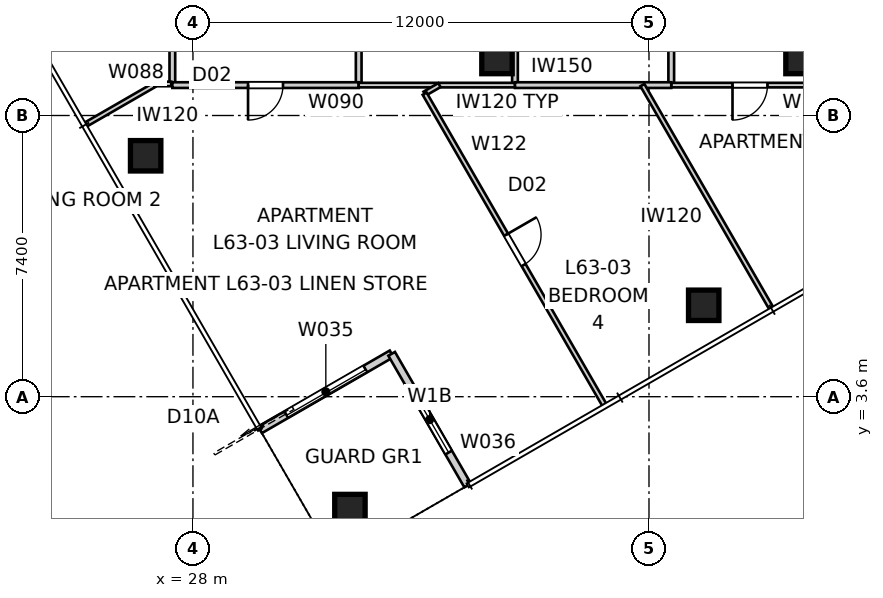
"""IFC4 building model, lengths in metres.
Left out: names, types, materials, properties, quantities, classifications, styles, units other than length and angle.
Written with IfcOpenShell. Run it as: python <this file> out.ifc"""

import sys

from ifc_helpers import new_model, si_unit, direction, frame, frame_2d, origin, origin_2d, place, context, subcontext, project, spatial, rectangle, extrude, element, fill, save


model = new_model("IFC4")
c1 = context("Model", 3, precision=1e-05, world=origin(), true_north=direction((0.0, 1.0)))
c2 = subcontext(c1, "Body", "Model", "MODEL_VIEW")
j1 = project(units=[si_unit("LENGTHUNIT", "METRE"), si_unit("PLANEANGLEUNIT", "RADIAN")], contexts=[c1])
p1 = place(None, origin())
s1 = spatial("IfcSite", under=j1, at=p1, CompositionType="ELEMENT")
p2 = place(p1, origin())
s2 = spatial("IfcBuilding", under=s1, at=p2, CompositionType="ELEMENT")
p3 = place(p2, frame((0.0, 0.0, 228.6)))
s3 = spatial("IfcBuildingStorey", under=s2, at=p3, CompositionType="ELEMENT", Elevation=228.6)
for number, where, z_axis, x_axis in (
    (1, (32.13, 0.63, 0.0), (0.0, 0.0, 1.0), (1.0, 0.0, 0.0)),
    (2, (41.44, 6.005, 0.0), (0.0, 0.0, 1.0), (1.0, 0.0, 0.0)),
    (3, (26.755, 9.94, 0.0), (0.0, 0.0, 1.0), (1.0, 0.0, 0.0)),
    (4, (36.0, 12.5, 0.0), (0.0, 0.0, 1.0), (1.0, 0.0, 0.0)),
    (5, (44.0, 12.5, 0.0), (0.0, 0.0, 1.0), (1.0, 0.0, 0.0)),
):
    element("IfcColumn", number, at=place(p3, frame(where, z_axis=z_axis, x_axis=x_axis)), inside=s3, PredefinedType="COLUMN", context=c2, shape_type="SweptSolid", body=[
        extrude(rectangle(XDim=0.8, YDim=0.8, at=origin_2d()), origin(), (0.0, 0.0, 1.0), 3.4),
    ])
p4 = place(p3, frame((29.764, 2.729, 0.0), z_axis=(0.0, 0.0, 1.0), x_axis=(0.866026010844, 0.49999894854, 0.0)))
e6 = element("IfcWall", 6, at=p4, inside=s3, PredefinedType="SOLIDWALL", context=c2, shape_type="SweptSolid", body=[
    extrude(rectangle(XDim=4.0, YDim=0.2, at=frame_2d((2.0, 0.0))), origin(), (0.0, 0.0, 1.0), 3.25),
])
p5 = place(p4, frame((0.8, 0.0, 0.0)))
e7 = element("IfcOpeningElement", 7, at=p5, cuts=e6, PredefinedType="OPENING", context=c2, shape_type="SweptSolid", body=[
    extrude(rectangle(XDim=2.4, YDim=2.1, at=frame_2d((1.2, 1.05))), frame((0.0, 0.11, 0.0), z_axis=(0.0, -1.0, 0.0), x_axis=(1.0, 0.0, 0.0)), (0.0, 0.0, 1.0), 0.22),
])
p6 = place(p3, frame((33.229, 4.729, 0.0), z_axis=(0.0, 0.0, 1.0), x_axis=(0.49999894854, -0.866026010844, 0.0)))
e8 = element("IfcWall", 8, at=p6, inside=s3, PredefinedType="SOLIDWALL", context=c2, shape_type="SweptSolid", body=[
    extrude(rectangle(XDim=4.0, YDim=0.2, at=frame_2d((2.0, 0.0))), origin(), (0.0, 0.0, 1.0), 3.25),
])
p7 = place(p6, frame((1.0, 0.0, 0.45)))
e9 = element("IfcOpeningElement", 9, at=p7, cuts=e8, PredefinedType="OPENING", context=c2, shape_type="SweptSolid", body=[
    extrude(rectangle(XDim=2.0, YDim=1.8, at=frame_2d((1.0, 0.9))), frame((0.0, 0.11, 0.0), z_axis=(0.0, -1.0, 0.0), x_axis=(1.0, 0.0, 0.0)), (0.0, 0.0, 1.0), 0.22),
])
p8 = place(p3, frame((27.458, 11.8, 0.0), z_axis=(0.0, 0.0, 1.0), x_axis=(0.0, 1.0, 0.0)))
e10 = element("IfcWall", 10, at=p8, inside=s3, PredefinedType="SOLIDWALL", context=c2, shape_type="SweptSolid", body=[
    extrude(rectangle(XDim=6.15, YDim=0.15, at=frame_2d((3.075, 0.0))), origin(), (0.0, 0.0, 1.0), 3.25),
])
p9 = place(p8, frame((4.396, 0.0, 0.0)))
e11 = element("IfcOpeningElement", 11, at=p9, cuts=e10, PredefinedType="OPENING", context=c2, shape_type="SweptSolid", body=[
    extrude(rectangle(XDim=0.96, YDim=2.1, at=frame_2d((0.48, 1.05))), frame((0.0, 0.085, 0.0), z_axis=(0.0, -1.0, 0.0), x_axis=(1.0, 0.0, 0.0)), (0.0, 0.0, 1.0), 0.17),
])
p10 = place(p8, frame((1.074, 0.0, 0.0)))
e12 = element("IfcOpeningElement", 12, at=p10, cuts=e10, PredefinedType="OPENING", context=c2, shape_type="SweptSolid", body=[
    extrude(rectangle(XDim=0.92, YDim=2.34, at=frame_2d((0.46, 1.17))), frame((0.0, 0.085, 0.0), z_axis=(0.0, -1.0, 0.0), x_axis=(1.0, 0.0, 0.0)), (0.0, 0.0, 1.0), 0.17),
])
p11 = place(p3, frame((32.361, 14.869, 0.0), z_axis=(0.0, 0.0, 1.0), x_axis=(0.0, -1.0, 0.0)))
e13 = element("IfcWall", 13, at=p11, inside=s3, PredefinedType="SOLIDWALL", context=c2, shape_type="SweptSolid", body=[
    extrude(rectangle(XDim=3.069, YDim=0.15, at=frame_2d((1.534, 0.0))), origin(), (0.0, 0.0, 1.0), 3.25),
])
p12 = place(p11, frame((1.074, 0.0, 0.0)))
e14 = element("IfcOpeningElement", 14, at=p12, cuts=e13, PredefinedType="OPENING", context=c2, shape_type="SweptSolid", body=[
    extrude(rectangle(XDim=0.92, YDim=2.34, at=frame_2d((0.46, 1.17))), frame((0.0, 0.085, 0.0), z_axis=(0.0, -1.0, 0.0), x_axis=(1.0, 0.0, 0.0)), (0.0, 0.0, 1.0), 0.17),
])
p13 = place(p3, frame((32.361, 11.8, 0.0), z_axis=(0.0, 0.0, 1.0), x_axis=(-1.0, 0.0, 0.0)))
e15 = element("IfcWall", 15, at=p13, inside=s3, PredefinedType="SOLIDWALL", context=c2, shape_type="SweptSolid", body=[
    extrude(rectangle(XDim=4.903, YDim=0.15, at=frame_2d((2.452, 0.0))), origin(), (0.0, 0.0, 1.0), 3.25),
])
p14 = place(p13, frame((1.992, 0.0, 0.0)))
e16 = element("IfcOpeningElement", 16, at=p14, cuts=e15, PredefinedType="OPENING", context=c2, shape_type="SweptSolid", body=[
    extrude(rectangle(XDim=0.92, YDim=2.34, at=frame_2d((0.46, 1.17))), frame((0.0, 0.085, 0.0), z_axis=(0.0, -1.0, 0.0), x_axis=(1.0, 0.0, 0.0)), (0.0, 0.0, 1.0), 0.17),
])
p15 = place(p3, frame((27.428, 11.83, 0.0), z_axis=(0.0, 0.0, 1.0), x_axis=(-1.0, 0.0, 0.0)))
e17 = element("IfcWall", 17, at=p15, inside=s3, PredefinedType="PARTITIONING", context=c2, shape_type="SweptSolid", body=[
    extrude(rectangle(XDim=0.421, YDim=0.12, at=frame_2d((0.211, 0.0))), origin(), (0.0, 0.0, 1.0), 3.25),
])
p16 = place(p3, frame((26.976, 11.8, 0.0), z_axis=(0.0, 0.0, 1.0), x_axis=(-0.866046860819, -0.499962833484, 0.0)))
e18 = element("IfcWall", 18, at=p16, inside=s3, PredefinedType="PARTITIONING", context=c2, shape_type="SweptSolid", body=[
    extrude(rectangle(XDim=2.081, YDim=0.12, at=frame_2d((1.041, 0.0))), origin(), (0.0, 0.0, 1.0), 3.25),
])
p17 = place(p3, frame((40.586, 11.8, 0.0), z_axis=(0.0, 0.0, 1.0), x_axis=(0.0, 1.0, 0.0)))
e19 = element("IfcWall", 19, at=p17, inside=s3, PredefinedType="SOLIDWALL", context=c2, shape_type="SweptSolid", body=[
    extrude(rectangle(XDim=6.1, YDim=0.15, at=frame_2d((3.05, 0.0))), origin(), (0.0, 0.0, 1.0), 3.25),
])
p18 = place(p17, frame((2.59, 0.0, 0.0)))
e20 = element("IfcOpeningElement", 20, at=p18, cuts=e19, PredefinedType="OPENING", context=c2, shape_type="SweptSolid", body=[
    extrude(rectangle(XDim=0.92, YDim=2.34, at=frame_2d((0.46, 1.17))), frame((0.0, 0.085, 0.0), z_axis=(0.0, -1.0, 0.0), x_axis=(1.0, 0.0, 0.0)), (0.0, 0.0, 1.0), 0.17),
])
p19 = place(p3, frame((44.729, 11.8, 0.0), z_axis=(0.0, 0.0, 1.0), x_axis=(-1.0, 0.0, 0.0)))
e21 = element("IfcWall", 21, at=p19, inside=s3, PredefinedType="PARTITIONING", context=c2, shape_type="SweptSolid", body=[
    extrude(rectangle(XDim=4.144, YDim=0.12, at=frame_2d((2.072, 0.0))), origin(), (0.0, 0.0, 1.0), 3.25),
])
p20 = place(p19, frame((1.612, 0.0, 0.0)))
e22 = element("IfcOpeningElement", 22, at=p20, cuts=e21, PredefinedType="OPENING", context=c2, shape_type="SweptSolid", body=[
    extrude(rectangle(XDim=0.92, YDim=2.34, at=frame_2d((0.46, 1.17))), frame((0.0, 0.07, 0.0), z_axis=(0.0, -1.0, 0.0), x_axis=(1.0, 0.0, 0.0)), (0.0, 0.0, 1.0), 0.14),
])
p21 = place(p3, frame((36.474, 17.9, 0.0), z_axis=(0.0, 0.0, 1.0), x_axis=(0.0, -1.0, 0.0)))
e23 = element("IfcWall", 23, at=p21, inside=s3, PredefinedType="SOLIDWALL", context=c2, shape_type="SweptSolid", body=[
    extrude(rectangle(XDim=6.1, YDim=0.15, at=frame_2d((3.05, 0.0))), origin(), (0.0, 0.0, 1.0), 3.25),
])
p22 = place(p21, frame((2.59, 0.0, 0.0)))
e24 = element("IfcOpeningElement", 24, at=p22, cuts=e23, PredefinedType="OPENING", context=c2, shape_type="SweptSolid", body=[
    extrude(rectangle(XDim=0.92, YDim=2.34, at=frame_2d((0.46, 1.17))), frame((0.0, 0.085, 0.0), z_axis=(0.0, -1.0, 0.0), x_axis=(1.0, 0.0, 0.0)), (0.0, 0.0, 1.0), 0.17),
])
p23 = place(p3, frame((36.474, 11.8, 0.0), z_axis=(0.0, 0.0, 1.0), x_axis=(-1.0, 0.0, 0.0)))
e25 = element("IfcWall", 25, at=p23, inside=s3, PredefinedType="PARTITIONING", context=c2, shape_type="SweptSolid", body=[
    extrude(rectangle(XDim=4.112, YDim=0.12, at=frame_2d((2.056, 0.0))), origin(), (0.0, 0.0, 1.0), 3.25),
])
p24 = place(p3, frame((40.586, 11.8, 0.0), z_axis=(0.0, 0.0, 1.0), x_axis=(-1.0, 0.0, 0.0)))
e26 = element("IfcWall", 26, at=p24, inside=s3, PredefinedType="SOLIDWALL", context=c2, shape_type="SweptSolid", body=[
    extrude(rectangle(XDim=4.112, YDim=0.15, at=frame_2d((2.056, 0.0))), origin(), (0.0, 0.0, 1.0), 3.25),
])
p25 = place(p3, frame((34.486, 11.8, 0.0), z_axis=(0.0, 0.0, 1.0), x_axis=(-0.865896406789, -0.500223362819, 0.0)))
e27 = element("IfcWall", 27, at=p25, inside=s3, PredefinedType="PARTITIONING", context=c2, shape_type="SweptSolid", body=[
    extrude(rectangle(XDim=0.45, YDim=0.12, at=frame_2d((0.225, 0.0))), origin(), (0.0, 0.0, 1.0), 3.25),
])
p26 = place(p3, frame((34.097, 11.575, 0.0), z_axis=(0.0, 0.0, 1.0), x_axis=(0.49999364752, -0.86602907136, 0.0)))
e28 = element("IfcWall", 28, at=p26, inside=s3, PredefinedType="PARTITIONING", context=c2, shape_type="SweptSolid", body=[
    extrude(rectangle(XDim=9.455, YDim=0.12, at=frame_2d((4.728, 0.0))), origin(), (0.0, 0.0, 1.0), 3.25),
])
p27 = place(p26, frame((4.288, 0.0, 0.0)))
e29 = element("IfcOpeningElement", 29, at=p27, cuts=e28, PredefinedType="OPENING", context=c2, shape_type="SweptSolid", body=[
    extrude(rectangle(XDim=0.92, YDim=2.34, at=frame_2d((0.46, 1.17))), frame((0.0, 0.07, 0.0), z_axis=(0.0, -1.0, 0.0), x_axis=(1.0, 0.0, 0.0)), (0.0, 0.0, 1.0), 0.14),
])
p28 = place(p3, frame((43.219, 5.924, 0.0), z_axis=(0.0, 0.0, 1.0), x_axis=(-0.500009005995, 0.866020204108, 0.0)))
e30 = element("IfcWall", 30, at=p28, inside=s3, PredefinedType="PARTITIONING", context=c2, shape_type="SweptSolid", body=[
    extrude(rectangle(XDim=6.785, YDim=0.12, at=frame_2d((3.393, 0.0))), origin(), (0.0, 0.0, 1.0), 3.25),
])
p29 = place(p5, origin())
e31 = element("IfcDoor", 31, at=p29, inside=s3, OperationType="SLIDING_TO_LEFT", PredefinedType="DOOR", context=c2, shape_type="SweptSolid", body=[
    extrude(rectangle(XDim=2.4, YDim=2.1, at=frame_2d((1.2, 1.05))), frame((0.0, 0.025, 0.0), z_axis=(0.0, -1.0, 0.0), x_axis=(1.0, 0.0, 0.0)), (0.0, 0.0, 1.0), 0.05),
])
fill(e7, e31)
p30 = place(p7, origin())
e32 = element("IfcWindow", 32, at=p30, inside=s3, PartitioningType="SINGLE_PANEL", PredefinedType="WINDOW", context=c2, shape_type="SweptSolid", body=[
    extrude(rectangle(XDim=2.0, YDim=1.8, at=frame_2d((1.0, 0.9))), frame((0.0, 0.03, 0.0), z_axis=(0.0, -1.0, 0.0), x_axis=(1.0, 0.0, 0.0)), (0.0, 0.0, 1.0), 0.06),
])
fill(e9, e32)
p31 = place(p14, origin())
e33 = element("IfcDoor", 33, at=p31, inside=s3, OperationType="SINGLE_SWING_RIGHT", PredefinedType="DOOR", context=c2, shape_type="SweptSolid", body=[
    extrude(rectangle(XDim=0.92, YDim=2.34, at=frame_2d((0.46, 1.17))), frame((0.0, 0.025, 0.0), z_axis=(0.0, -1.0, 0.0), x_axis=(1.0, 0.0, 0.0)), (0.0, 0.0, 1.0), 0.05),
])
fill(e16, e33)
p32 = place(p27, origin())
e34 = element("IfcDoor", 34, at=p32, inside=s3, OperationType="SINGLE_SWING_LEFT", PredefinedType="DOOR", context=c2, shape_type="SweptSolid", body=[
    extrude(rectangle(XDim=0.92, YDim=2.34, at=frame_2d((0.46, 1.17))), frame((0.0, 0.025, 0.0), z_axis=(0.0, -1.0, 0.0), x_axis=(1.0, 0.0, 0.0)), (0.0, 0.0, 1.0), 0.05),
])
fill(e29, e34)
p33 = place(p20, origin())
e35 = element("IfcDoor", 35, at=p33, inside=s3, OperationType="SINGLE_SWING_RIGHT", PredefinedType="DOOR", context=c2, shape_type="SweptSolid", body=[
    extrude(rectangle(XDim=0.92, YDim=2.34, at=frame_2d((0.46, 1.17))), frame((0.0, 0.025, 0.0), z_axis=(0.0, -1.0, 0.0), x_axis=(1.0, 0.0, 0.0)), (0.0, 0.0, 1.0), 0.05),
])
fill(e22, e35)
save(model, sys.argv[1])
